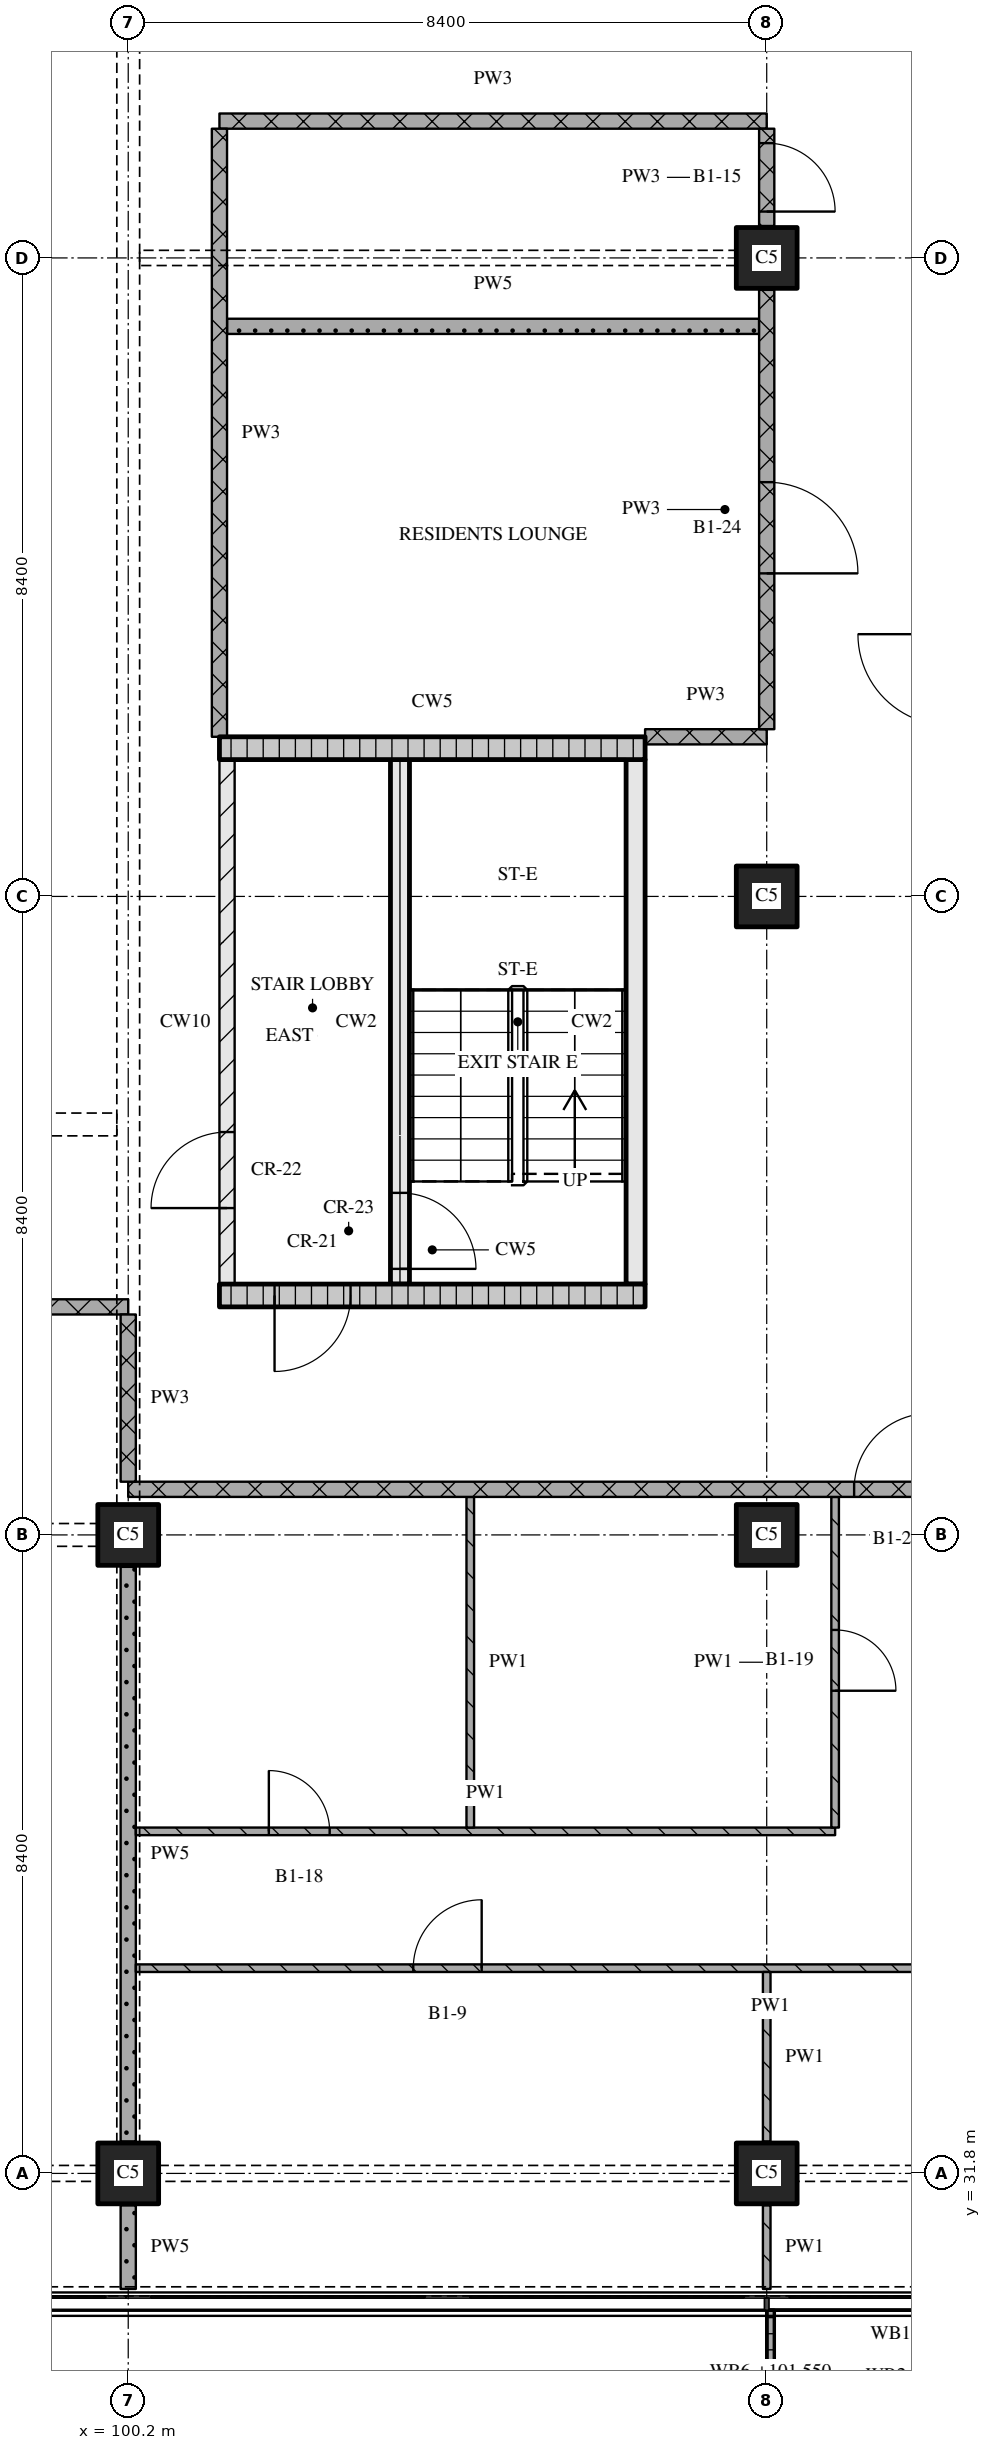
"""IFC4 building model, lengths in metres.
Left out: names, types, materials, properties, quantities, classifications, styles, units other than length and angle.
Written with IfcOpenShell. Run it as: python <this file> out.ifc"""

import sys

from ifc_helpers import new_model, si_unit, direction, frame, frame_2d, origin, origin_2d, place, context, subcontext, project, spatial, polyline, rectangle, outline, extrude, element, fill, save


model = new_model("IFC4")
c1 = context("Model", 3, precision=1e-05, world=origin(), true_north=direction((0.0, 1.0)))
c2 = subcontext(c1, "Body", "Model", "MODEL_VIEW")
j1 = project(units=[si_unit("LENGTHUNIT", "METRE"), si_unit("PLANEANGLEUNIT", "RADIAN")], contexts=[c1])
p1 = place(None, origin())
s1 = spatial("IfcSite", under=j1, at=p1, CompositionType="ELEMENT")
p2 = place(p1, origin())
s2 = spatial("IfcBuilding", under=s1, at=p2, CompositionType="ELEMENT")
p3 = place(p2, frame((0.0, 0.0, 98.85)))
s3 = spatial("IfcBuildingStorey", under=s2, at=p3, CompositionType="ELEMENT", Elevation=98.85)
for number, where, z_axis, x_axis in (
    (1, (100.2, 31.8, 0.0), (0.0, 0.0, 1.0), (1.0, 0.0, 0.0)),
    (2, (100.2, 40.2, 0.0), (0.0, 0.0, 1.0), (1.0, 0.0, 0.0)),
    (3, (108.6, 31.8, 0.0), (0.0, 0.0, 1.0), (1.0, 0.0, 0.0)),
    (4, (108.6, 40.2, 0.0), (0.0, 0.0, 1.0), (1.0, 0.0, 0.0)),
    (5, (108.6, 48.6, 0.0), (0.0, 0.0, 1.0), (1.0, 0.0, 0.0)),
    (6, (108.6, 57.0, 0.0), (0.0, 0.0, 1.0), (1.0, 0.0, 0.0)),
):
    element("IfcColumn", number, at=place(p3, frame(where, z_axis=z_axis, x_axis=x_axis)), inside=s3, PredefinedType="COLUMN", context=c2, shape_type="SweptSolid", body=[
        extrude(rectangle(XDim=0.8, YDim=0.8, at=origin_2d()), origin(), (0.0, 0.0, 1.0), 3.6),
    ])
p4 = place(p3, origin())
e7 = element("IfcWall", 7, at=p4, inside=s3, PredefinedType="SOLIDWALL", context=c2, shape_type="SweptSolid", body=[
    extrude(outline(polyline([(108.6, 30.0), (108.7, 30.0), (108.7, 28.367), (112.7, 28.367), (112.7, 30.0), (112.8, 30.0), (112.8, 28.267), (108.6, 28.267), (108.6, 30.0)])), origin(), (0.0, 0.0, 1.0), 1.0),
])
p5 = place(p3, frame((101.4, 43.35, 0.0), z_axis=(0.0, 0.0, 1.0), x_axis=(1.0, 0.0, 0.0)))
e8 = element("IfcWall", 8, at=p5, inside=s3, PredefinedType="SOLIDWALL", context=c2, shape_type="SweptSolid", body=[
    extrude(rectangle(XDim=5.6, YDim=0.3, at=frame_2d((2.8, 0.0))), origin(), (0.0, 0.0, 1.0), 3.32),
])
p6 = place(p5, frame((0.725, 0.0, 0.0)))
e9 = element("IfcOpeningElement", 9, at=p6, cuts=e8, PredefinedType="OPENING", context=c2, shape_type="SweptSolid", body=[
    extrude(rectangle(XDim=1.0, YDim=2.1, at=frame_2d((0.5, 1.05))), frame((0.0, 0.16, 0.0), z_axis=(0.0, -1.0, 0.0), x_axis=(1.0, 0.0, 0.0)), (0.0, 0.0, 1.0), 0.32),
])
p7 = place(p3, frame((101.5, 43.5, 0.0), z_axis=(0.0, 0.0, 1.0), x_axis=(0.0, 1.0, 0.0)))
e10 = element("IfcWall", 10, at=p7, inside=s3, PredefinedType="PARTITIONING", context=c2, shape_type="SweptSolid", body=[
    extrude(rectangle(XDim=6.9, YDim=0.2, at=frame_2d((3.45, 0.0))), origin(), (0.0, 0.0, 1.0), 3.32),
])
p8 = place(p7, frame((1.0, 0.0, 0.0)))
e11 = element("IfcOpeningElement", 11, at=p8, cuts=e10, PredefinedType="OPENING", context=c2, shape_type="SweptSolid", body=[
    extrude(rectangle(XDim=1.0, YDim=2.1, at=frame_2d((0.5, 1.05))), frame((0.0, 0.11, 0.0), z_axis=(0.0, -1.0, 0.0), x_axis=(1.0, 0.0, 0.0)), (0.0, 0.0, 1.0), 0.22),
])
p9 = place(p3, frame((103.775, 43.5, 0.0), z_axis=(0.0, 0.0, 1.0), x_axis=(0.0, 1.0, 0.0)))
e12 = element("IfcWall", 12, at=p9, inside=s3, PredefinedType="SOLIDWALL", context=c2, shape_type="SweptSolid", body=[
    extrude(rectangle(XDim=6.9, YDim=0.25, at=frame_2d((3.45, 0.0))), origin(), (0.0, 0.0, 1.0), 3.32),
])
p10 = place(p9, frame((0.2, 0.0, 0.0)))
e13 = element("IfcOpeningElement", 13, at=p10, cuts=e12, PredefinedType="OPENING", context=c2, shape_type="SweptSolid", body=[
    extrude(rectangle(XDim=1.0, YDim=2.1, at=frame_2d((0.5, 1.05))), frame((0.0, 0.135, 0.0), z_axis=(0.0, -1.0, 0.0), x_axis=(1.0, 0.0, 0.0)), (0.0, 0.0, 1.0), 0.27),
])
p11 = place(p3, frame((106.875, 43.5, 0.0), z_axis=(0.0, 0.0, 1.0), x_axis=(0.0, 1.0, 0.0)))
e14 = element("IfcWall", 14, at=p11, inside=s3, PredefinedType="SOLIDWALL", context=c2, shape_type="SweptSolid", body=[
    extrude(rectangle(XDim=6.9, YDim=0.25, at=frame_2d((3.45, 0.0))), origin(), (0.0, 0.0, 1.0), 3.32),
])
p12 = place(p3, frame((101.4, 50.55, 0.0), z_axis=(0.0, 0.0, 1.0), x_axis=(1.0, 0.0, 0.0)))
e15 = element("IfcWall", 15, at=p12, inside=s3, PredefinedType="SOLIDWALL", context=c2, shape_type="SweptSolid", body=[
    extrude(rectangle(XDim=5.6, YDim=0.3, at=frame_2d((2.8, 0.0))), origin(), (0.0, 0.0, 1.0), 3.32),
])
p13 = place(p3, frame((117.0, 34.5, 0.0), z_axis=(0.0, 0.0, 1.0), x_axis=(-1.0, 0.0, 0.0)))
e16 = element("IfcWall", 16, at=p13, inside=s3, PredefinedType="PARTITIONING", context=c2, shape_type="SweptSolid", body=[
    extrude(rectangle(XDim=16.7, YDim=0.1, at=frame_2d((8.35, 0.0))), origin(), (0.0, 0.0, 1.0), 3.32),
])
p14 = place(p13, frame((12.15, 0.0, 0.0)))
e17 = element("IfcOpeningElement", 17, at=p14, cuts=e16, PredefinedType="OPENING", context=c2, shape_type="SweptSolid", body=[
    extrude(rectangle(XDim=0.9, YDim=2.1, at=frame_2d((0.45, 1.05))), frame((0.0, 0.06, 0.0), z_axis=(0.0, -1.0, 0.0), x_axis=(1.0, 0.0, 0.0)), (0.0, 0.0, 1.0), 0.12),
])
p15 = place(p3, frame((100.3, 36.3, 0.0), z_axis=(0.0, 0.0, 1.0), x_axis=(1.0, 0.0, 0.0)))
e18 = element("IfcWall", 18, at=p15, inside=s3, PredefinedType="PARTITIONING", context=c2, shape_type="SweptSolid", body=[
    extrude(rectangle(XDim=9.2, YDim=0.1, at=frame_2d((4.6, 0.0))), origin(), (0.0, 0.0, 1.0), 3.32),
])
p16 = place(p15, frame((1.75, 0.0, 0.0)))
e19 = element("IfcOpeningElement", 19, at=p16, cuts=e18, PredefinedType="OPENING", context=c2, shape_type="SweptSolid", body=[
    extrude(rectangle(XDim=0.8, YDim=2.1, at=frame_2d((0.4, 1.05))), frame((0.0, 0.06, 0.0), z_axis=(0.0, -1.0, 0.0), x_axis=(1.0, 0.0, 0.0)), (0.0, 0.0, 1.0), 0.12),
])
p17 = place(p3, frame((124.38, 40.8, 0.0), z_axis=(0.0, 0.0, 1.0), x_axis=(-1.0, 0.0, 0.0)))
e20 = element("IfcWall", 20, at=p17, inside=s3, PredefinedType="PARTITIONING", context=c2, shape_type="SweptSolid", body=[
    extrude(rectangle(XDim=24.18, YDim=0.2, at=frame_2d((12.09, 0.0))), origin(), (0.0, 0.0, 1.0), 3.32),
])
p18 = place(p17, frame((13.63, 0.0, 0.0)))
e21 = element("IfcOpeningElement", 21, at=p18, cuts=e20, PredefinedType="OPENING", context=c2, shape_type="SweptSolid", body=[
    extrude(rectangle(XDim=1.0, YDim=2.1, at=frame_2d((0.5, 1.05))), frame((0.0, 0.11, 0.0), z_axis=(0.0, -1.0, 0.0), x_axis=(1.0, 0.0, 0.0)), (0.0, 0.0, 1.0), 0.22),
])
p19 = place(p3, frame((100.2, 43.2, 0.0), z_axis=(0.0, 0.0, 1.0), x_axis=(-1.0, 0.0, 0.0)))
e22 = element("IfcWall", 22, at=p19, inside=s3, PredefinedType="PARTITIONING", context=c2, shape_type="SweptSolid", body=[
    extrude(rectangle(XDim=25.2, YDim=0.2, at=frame_2d((12.6, 0.0))), origin(), (0.0, 0.0, 1.0), 3.32),
])
p20 = place(p19, frame((7.8, 0.0, 0.0)))
e23 = element("IfcOpeningElement", 23, at=p20, cuts=e22, PredefinedType="OPENING", context=c2, shape_type="SweptSolid", body=[
    extrude(rectangle(XDim=1.2, YDim=2.1, at=frame_2d((0.6, 1.05))), frame((0.0, 0.11, 0.0), z_axis=(0.0, -1.0, 0.0), x_axis=(1.0, 0.0, 0.0)), (0.0, 0.0, 1.0), 0.22),
])
p21 = place(p19, frame((20.4, 0.0, 0.0)))
e24 = element("IfcOpeningElement", 24, at=p21, cuts=e22, PredefinedType="OPENING", context=c2, shape_type="SweptSolid", body=[
    extrude(rectangle(XDim=1.2, YDim=2.1, at=frame_2d((0.6, 1.05))), frame((0.0, 0.11, 0.0), z_axis=(0.0, -1.0, 0.0), x_axis=(1.0, 0.0, 0.0)), (0.0, 0.0, 1.0), 0.22),
])
p22 = place(p3, frame((107.0, 50.7, 0.0), z_axis=(0.0, 0.0, 1.0), x_axis=(1.0, 0.0, 0.0)))
e25 = element("IfcWall", 25, at=p22, inside=s3, PredefinedType="PARTITIONING", context=c2, shape_type="SweptSolid", body=[
    extrude(rectangle(XDim=1.6, YDim=0.2, at=frame_2d((0.8, 0.0))), origin(), (0.0, 0.0, 1.0), 3.32),
])
p23 = place(p3, frame((101.5, 56.1, 0.0), z_axis=(0.0, 0.0, 1.0), x_axis=(1.0, 0.0, 0.0)))
e26 = element("IfcWall", 26, at=p23, inside=s3, PredefinedType="PARTITIONING", context=c2, shape_type="SweptSolid", body=[
    extrude(rectangle(XDim=7.0, YDim=0.2, at=frame_2d((3.5, 0.0))), origin(), (0.0, 0.0, 1.0), 3.32),
])
p24 = place(p3, frame((101.4, 58.8, 0.0), z_axis=(0.0, 0.0, 1.0), x_axis=(1.0, 0.0, 0.0)))
e27 = element("IfcWall", 27, at=p24, inside=s3, PredefinedType="PARTITIONING", context=c2, shape_type="SweptSolid", body=[
    extrude(rectangle(XDim=7.2, YDim=0.2, at=frame_2d((3.6, 0.0))), origin(), (0.0, 0.0, 1.0), 3.32),
])
p25 = place(p3, frame((100.2, 43.1, 0.0), z_axis=(0.0, 0.0, 1.0), x_axis=(0.0, -1.0, 0.0)))
e28 = element("IfcWall", 28, at=p25, inside=s3, PredefinedType="PARTITIONING", context=c2, shape_type="SweptSolid", body=[
    extrude(rectangle(XDim=2.2, YDim=0.2, at=frame_2d((1.1, 0.0))), origin(), (0.0, 0.0, 1.0), 2.43),
])
p26 = place(p3, frame((100.2, 31.38, 0.0), z_axis=(0.0, 0.0, 1.0), x_axis=(0.0, -1.0, 0.0)))
e29 = element("IfcWall", 29, at=p26, inside=s3, PredefinedType="PARTITIONING", context=c2, shape_type="SweptSolid", body=[
    extrude(rectangle(XDim=1.1, YDim=0.2, at=frame_2d((0.55, 0.0))), origin(), (0.0, 0.0, 1.0), 3.32),
])
p27 = place(p3, frame((100.2, 39.78, 0.0), z_axis=(0.0, 0.0, 1.0), x_axis=(0.0, -1.0, 0.0)))
e30 = element("IfcWall", 30, at=p27, inside=s3, PredefinedType="PARTITIONING", context=c2, shape_type="SweptSolid", body=[
    extrude(rectangle(XDim=7.56, YDim=0.2, at=frame_2d((3.78, 0.0))), origin(), (0.0, 0.0, 1.0), 2.83),
])
p28 = place(p3, frame((101.4, 58.7, 0.0), z_axis=(0.0, 0.0, 1.0), x_axis=(0.0, -1.0, 0.0)))
e31 = element("IfcWall", 31, at=p28, inside=s3, PredefinedType="PARTITIONING", context=c2, shape_type="SweptSolid", body=[
    extrude(rectangle(XDim=8.0, YDim=0.2, at=frame_2d((4.0, 0.0))), origin(), (0.0, 0.0, 1.0), 3.32),
])
p29 = place(p3, frame((104.7, 40.7, 0.0), z_axis=(0.0, 0.0, 1.0), x_axis=(0.0, -1.0, 0.0)))
e32 = element("IfcWall", 32, at=p29, inside=s3, PredefinedType="PARTITIONING", context=c2, shape_type="SweptSolid", body=[
    extrude(rectangle(XDim=4.35, YDim=0.1, at=frame_2d((2.175, 0.0))), origin(), (0.0, 0.0, 1.0), 3.32),
])
p30 = place(p3, frame((108.6, 50.8, 0.0), z_axis=(0.0, 0.0, 1.0), x_axis=(0.0, 1.0, 0.0)))
e33 = element("IfcWall", 33, at=p30, inside=s3, PredefinedType="PARTITIONING", context=c2, shape_type="SweptSolid", body=[
    extrude(rectangle(XDim=5.78, YDim=0.2, at=frame_2d((2.89, 0.0))), origin(), (0.0, 0.0, 1.0), 3.32),
])
p31 = place(p30, frame((2.05, 0.0, 0.0)))
e34 = element("IfcOpeningElement", 34, at=p31, cuts=e33, PredefinedType="OPENING", context=c2, shape_type="SweptSolid", body=[
    extrude(rectangle(XDim=1.2, YDim=2.1, at=frame_2d((0.6, 1.05))), frame((0.0, 0.11, 0.0), z_axis=(0.0, -1.0, 0.0), x_axis=(1.0, 0.0, 0.0)), (0.0, 0.0, 1.0), 0.22),
])
p32 = place(p3, frame((108.6, 57.42, 0.0), z_axis=(0.0, 0.0, 1.0), x_axis=(0.0, 1.0, 0.0)))
e35 = element("IfcWall", 35, at=p32, inside=s3, PredefinedType="PARTITIONING", context=c2, shape_type="SweptSolid", body=[
    extrude(rectangle(XDim=1.28, YDim=0.2, at=frame_2d((0.64, 0.0))), origin(), (0.0, 0.0, 1.0), 3.32),
])
p33 = place(p32, frame((0.19, 0.0, 0.0)))
e36 = element("IfcOpeningElement", 36, at=p33, cuts=e35, PredefinedType="OPENING", context=c2, shape_type="SweptSolid", body=[
    extrude(rectangle(XDim=0.9, YDim=2.1, at=frame_2d((0.45, 1.05))), frame((0.0, 0.11, 0.0), z_axis=(0.0, -1.0, 0.0), x_axis=(1.0, 0.0, 0.0)), (0.0, 0.0, 1.0), 0.22),
])
p34 = place(p3, frame((108.6, 31.38, 0.0), z_axis=(0.0, 0.0, 1.0), x_axis=(0.0, -1.0, 0.0)))
e37 = element("IfcWall", 37, at=p34, inside=s3, PredefinedType="PARTITIONING", context=c2, shape_type="SweptSolid", body=[
    extrude(rectangle(XDim=1.1, YDim=0.1, at=frame_2d((0.55, 0.0))), origin(), (0.0, 0.0, 1.0), 3.32),
])
p35 = place(p3, frame((108.6, 34.45, 0.0), z_axis=(0.0, 0.0, 1.0), x_axis=(0.0, -1.0, 0.0)))
e38 = element("IfcWall", 38, at=p35, inside=s3, PredefinedType="PARTITIONING", context=c2, shape_type="SweptSolid", body=[
    extrude(rectangle(XDim=2.23, YDim=0.1, at=frame_2d((1.115, 0.0))), origin(), (0.0, 0.0, 1.0), 3.32),
])
p36 = place(p3, frame((109.5, 36.35, 0.0), z_axis=(0.0, 0.0, 1.0), x_axis=(0.0, 1.0, 0.0)))
e39 = element("IfcWall", 39, at=p36, inside=s3, PredefinedType="PARTITIONING", context=c2, shape_type="SweptSolid", body=[
    extrude(rectangle(XDim=4.35, YDim=0.1, at=frame_2d((2.175, 0.0))), origin(), (0.0, 0.0, 1.0), 3.32),
])
p37 = place(p36, frame((1.8, 0.0, 0.0)))
e40 = element("IfcOpeningElement", 40, at=p37, cuts=e39, PredefinedType="OPENING", context=c2, shape_type="SweptSolid", body=[
    extrude(rectangle(XDim=0.8, YDim=2.1, at=frame_2d((0.4, 1.05))), frame((0.0, 0.06, 0.0), z_axis=(0.0, -1.0, 0.0), x_axis=(1.0, 0.0, 0.0)), (0.0, 0.0, 1.0), 0.12),
])
p38 = place(p6, origin())
e41 = element("IfcDoor", 41, at=p38, inside=s3, OperationType="SINGLE_SWING_RIGHT", PredefinedType="DOOR", context=c2, shape_type="SweptSolid", body=[
    extrude(rectangle(XDim=1.0, YDim=2.1, at=frame_2d((0.5, 1.05))), frame((0.0, 0.025, 0.0), z_axis=(0.0, -1.0, 0.0), x_axis=(1.0, 0.0, 0.0)), (0.0, 0.0, 1.0), 0.05),
])
fill(e9, e41)
p39 = place(p10, origin())
e42 = element("IfcDoor", 42, at=p39, inside=s3, OperationType="SINGLE_SWING_RIGHT", PredefinedType="DOOR", context=c2, shape_type="SweptSolid", body=[
    extrude(rectangle(XDim=1.0, YDim=2.1, at=frame_2d((0.5, 1.05))), frame((0.0, 0.025, 0.0), z_axis=(0.0, -1.0, 0.0), x_axis=(1.0, 0.0, 0.0)), (0.0, 0.0, 1.0), 0.05),
])
fill(e13, e42)
p40 = place(p8, origin())
e43 = element("IfcDoor", 43, at=p40, inside=s3, OperationType="SINGLE_SWING_LEFT", PredefinedType="DOOR", context=c2, shape_type="SweptSolid", body=[
    extrude(rectangle(XDim=1.0, YDim=2.1, at=frame_2d((0.5, 1.05))), frame((0.0, 0.025, 0.0), z_axis=(0.0, -1.0, 0.0), x_axis=(1.0, 0.0, 0.0)), (0.0, 0.0, 1.0), 0.05),
])
fill(e11, e43)
p41 = place(p14, origin())
e44 = element("IfcDoor", 44, at=p41, inside=s3, OperationType="SINGLE_SWING_RIGHT", PredefinedType="DOOR", context=c2, shape_type="SweptSolid", body=[
    extrude(rectangle(XDim=0.9, YDim=2.1, at=frame_2d((0.45, 1.05))), frame((0.0, 0.025, 0.0), z_axis=(0.0, -1.0, 0.0), x_axis=(1.0, 0.0, 0.0)), (0.0, 0.0, 1.0), 0.05),
])
fill(e17, e44)
p42 = place(p16, origin())
e45 = element("IfcDoor", 45, at=p42, inside=s3, OperationType="SINGLE_SWING_LEFT", PredefinedType="DOOR", context=c2, shape_type="SweptSolid", body=[
    extrude(rectangle(XDim=0.8, YDim=2.1, at=frame_2d((0.4, 1.05))), frame((0.0, 0.025, 0.0), z_axis=(0.0, -1.0, 0.0), x_axis=(1.0, 0.0, 0.0)), (0.0, 0.0, 1.0), 0.05),
])
fill(e19, e45)
p43 = place(p18, origin())
e46 = element("IfcDoor", 46, at=p43, inside=s3, OperationType="SINGLE_SWING_RIGHT", PredefinedType="DOOR", context=c2, shape_type="SweptSolid", body=[
    extrude(rectangle(XDim=1.0, YDim=2.1, at=frame_2d((0.5, 1.05))), frame((0.0, 0.025, 0.0), z_axis=(0.0, -1.0, 0.0), x_axis=(1.0, 0.0, 0.0)), (0.0, 0.0, 1.0), 0.05),
])
fill(e21, e46)
p44 = place(p31, origin())
e47 = element("IfcDoor", 47, at=p44, inside=s3, OperationType="SINGLE_SWING_RIGHT", PredefinedType="DOOR", context=c2, shape_type="SweptSolid", body=[
    extrude(rectangle(XDim=1.2, YDim=2.1, at=frame_2d((0.6, 1.05))), frame((0.0, 0.025, 0.0), z_axis=(0.0, -1.0, 0.0), x_axis=(1.0, 0.0, 0.0)), (0.0, 0.0, 1.0), 0.05),
])
fill(e34, e47)
p45 = place(p33, origin())
e48 = element("IfcDoor", 48, at=p45, inside=s3, OperationType="SINGLE_SWING_RIGHT", PredefinedType="DOOR", context=c2, shape_type="SweptSolid", body=[
    extrude(rectangle(XDim=0.9, YDim=2.1, at=frame_2d((0.45, 1.05))), frame((0.0, 0.025, 0.0), z_axis=(0.0, -1.0, 0.0), x_axis=(1.0, 0.0, 0.0)), (0.0, 0.0, 1.0), 0.05),
])
fill(e36, e48)
p46 = place(p37, origin())
e49 = element("IfcDoor", 49, at=p46, inside=s3, OperationType="SINGLE_SWING_RIGHT", PredefinedType="DOOR", context=c2, shape_type="SweptSolid", body=[
    extrude(rectangle(XDim=0.8, YDim=2.1, at=frame_2d((0.4, 1.05))), frame((0.0, 0.025, 0.0), z_axis=(0.0, -1.0, 0.0), x_axis=(1.0, 0.0, 0.0)), (0.0, 0.0, 1.0), 0.05),
])
fill(e40, e49)
save(model, sys.argv[1])
